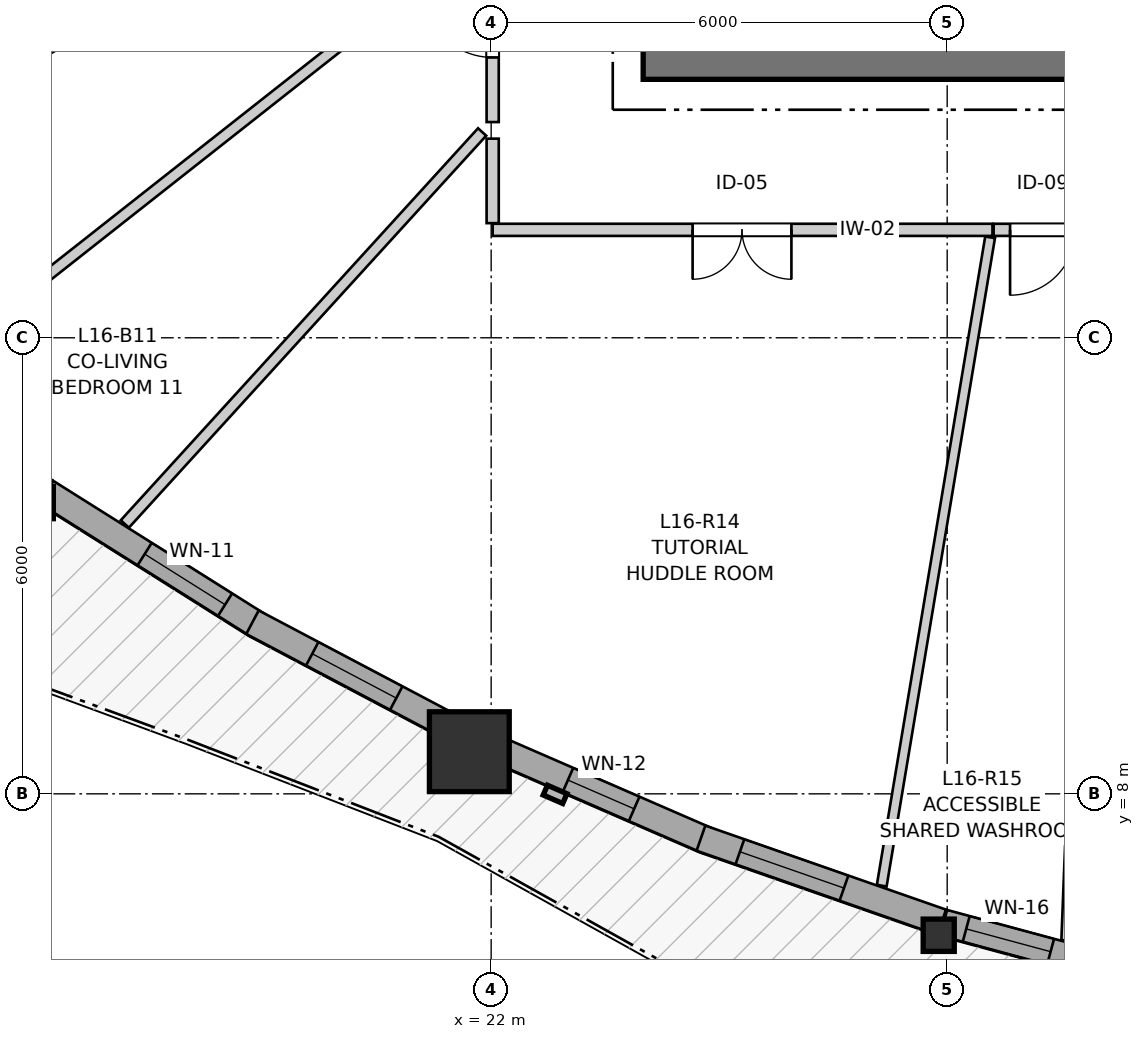
"""IFC4 building model, lengths in metres.
Left out: names, types, materials, properties, quantities, classifications, styles, units other than length and angle.
Written with IfcOpenShell. Run it as: python <this file> out.ifc"""

import sys

from ifc_helpers import new_model, si_unit, direction, frame, frame_2d, origin, origin_2d, place, context, subcontext, project, spatial, rectangle, i_section, extrude, source, transform, mapped, element, fill, save


model = new_model("IFC4")
c1 = context("Model", 3, precision=1e-05, world=origin(), true_north=direction((0.0, 1.0)))
c2 = subcontext(c1, "Body", "Model", "MODEL_VIEW")
j1 = project(units=[si_unit("LENGTHUNIT", "METRE"), si_unit("PLANEANGLEUNIT", "RADIAN")], contexts=[c1])
p1 = place(None, origin())
s1 = spatial("IfcSite", under=j1, at=p1, CompositionType="ELEMENT")
p2 = place(p1, origin())
s2 = spatial("IfcBuilding", under=s1, at=p2, CompositionType="ELEMENT")
p3 = place(p2, frame((0.0, 0.0, 55.8)))
s3 = spatial("IfcBuildingStorey", under=s2, at=p3, CompositionType="ELEMENT", Elevation=55.8)
p4 = place(p3, frame((24.0, 17.8, 0.0), z_axis=(0.0, 0.0, 1.0), x_axis=(1.0, 0.0, 0.0)))
e1 = element("IfcWall", 1, at=p4, inside=s3, PredefinedType="SHEAR", context=c2, shape_type="SweptSolid", body=[
    extrude(rectangle(XDim=12.7, YDim=0.8, at=frame_2d((6.35, 0.0))), origin(), (0.0, 0.0, 1.0), 2.94),
])
m1 = source(origin(), c2, "Body", "SweptSolid", [
    extrude(i_section(OverallWidth=0.409, OverallDepth=0.425, WebThickness=0.03, FlangeThickness=0.048, FilletRadius=0.015, at=origin_2d()), origin(), (0.0, 0.0, 1.0), 2.94),
])
p5 = place(p3, frame((16.035, 11.832, 0.0), z_axis=(0.0, 0.0, 1.0), x_axis=(1.0, 0.0, 0.0)))
e2 = element("IfcColumn", 2, at=p5, inside=s3, PredefinedType="PILASTER", context=c2, shape_type="MappedRepresentation", body=[
    mapped(m1, transform((0.0, 0.0, 0.0), x_axis=(1.0, 0.0, 0.0), y_axis=(0.0, 1.0, 0.0), z_axis=(0.0, 0.0, 1.0), scale=1.0)),
])
m2 = source(origin(), c2, "Body", "SweptSolid", [
    extrude(rectangle(XDim=1.05, YDim=1.05, at=origin_2d()), origin(), (0.0, 0.0, 1.0), 2.94),
])
p6 = place(p3, frame((21.713, 8.554, 0.0), z_axis=(0.0, 0.0, 1.0), x_axis=(1.0, 0.0, 0.0)))
e3 = element("IfcColumn", 3, at=p6, inside=s3, PredefinedType="COLUMN", context=c2, shape_type="MappedRepresentation", body=[
    mapped(m2, transform((0.0, 0.0, 0.0), x_axis=(1.0, 0.0, 0.0), y_axis=(0.0, 1.0, 0.0), z_axis=(0.0, 0.0, 1.0), scale=1.0)),
])
p7 = place(p3, frame((27.888, 6.139, 0.0), z_axis=(0.0, 0.0, 1.0), x_axis=(1.0, 0.0, 0.0)))
e4 = element("IfcColumn", 4, at=p7, inside=s3, PredefinedType="PILASTER", context=c2, shape_type="MappedRepresentation", body=[
    mapped(m1, transform((0.0, 0.0, 0.0), x_axis=(1.0, 0.0, 0.0), y_axis=(0.0, 1.0, 0.0), z_axis=(0.0, 0.0, 1.0), scale=1.0)),
])
p8 = place(p3, frame((13.457, 13.958, 0.0), z_axis=(0.0, 0.0, 1.0), x_axis=(0.803790514758, -0.594912437578, 0.0)))
e5 = element("IfcWall", 5, at=p8, inside=s3, PredefinedType="SOLIDWALL", context=c2, shape_type="SweptSolid", body=[
    extrude(rectangle(XDim=3.317, YDim=0.35, at=frame_2d((1.659, 0.0))), origin(), (0.0, 0.0, 1.0), 2.42),
])
p9 = place(p8, frame((1.468, 0.0, 0.82)))
e6 = element("IfcOpeningElement", 6, at=p9, cuts=e5, PredefinedType="OPENING", context=c2, shape_type="SweptSolid", body=[
    extrude(rectangle(XDim=1.4, YDim=1.35, at=frame_2d((0.7, 0.675))), frame((0.0, 0.185, 0.0), z_axis=(0.0, -1.0, 0.0), x_axis=(1.0, 0.0, 0.0)), (0.0, 0.0, 1.0), 0.37),
])
p10 = place(p3, frame((16.146, 11.97, 0.0), z_axis=(0.0, 0.0, 1.0), x_axis=(0.846405860611, -0.532538373381, 0.0)))
e7 = element("IfcWall", 7, at=p10, inside=s3, PredefinedType="SOLIDWALL", context=c2, shape_type="SweptSolid", body=[
    extrude(rectangle(XDim=3.298, YDim=0.35, at=frame_2d((1.649, 0.0))), origin(), (0.0, 0.0, 1.0), 2.42),
])
p11 = place(p10, frame((1.531, 0.0, 0.82)))
e8 = element("IfcOpeningElement", 8, at=p11, cuts=e7, PredefinedType="OPENING", context=c2, shape_type="SweptSolid", body=[
    extrude(rectangle(XDim=1.25, YDim=1.35, at=frame_2d((0.625, 0.675))), frame((0.0, 0.185, 0.0), z_axis=(0.0, -1.0, 0.0), x_axis=(1.0, 0.0, 0.0)), (0.0, 0.0, 1.0), 0.37),
])
p12 = place(p3, frame((18.86, 10.258, 0.0), z_axis=(0.0, 0.0, 1.0), x_axis=(0.884375478211, -0.46677619213, 0.0)))
e9 = element("IfcWall", 9, at=p12, inside=s3, PredefinedType="SOLIDWALL", context=c2, shape_type="SweptSolid", body=[
    extrude(rectangle(XDim=3.019, YDim=0.35, at=frame_2d((1.509, 0.0))), origin(), (0.0, 0.0, 1.0), 2.42),
])
p13 = place(p12, frame((0.889, 0.0, 0.82)))
e10 = element("IfcOpeningElement", 10, at=p13, cuts=e9, PredefinedType="OPENING", context=c2, shape_type="SweptSolid", body=[
    extrude(rectangle(XDim=1.25, YDim=1.35, at=frame_2d((0.625, 0.675))), frame((0.0, 0.185, 0.0), z_axis=(0.0, -1.0, 0.0), x_axis=(1.0, 0.0, 0.0)), (0.0, 0.0, 1.0), 0.37),
])
p14 = place(p3, frame((22.058, 8.595, 0.0), z_axis=(0.0, 0.0, 1.0), x_axis=(0.917112224483, -0.398629110458, 0.0)))
e11 = element("IfcWall", 11, at=p14, inside=s3, PredefinedType="SOLIDWALL", context=c2, shape_type="SweptSolid", body=[
    extrude(rectangle(XDim=3.037, YDim=0.35, at=frame_2d((1.519, 0.0))), origin(), (0.0, 0.0, 1.0), 2.42),
])
p15 = place(p14, frame((1.039, 0.0, 0.82)))
e12 = element("IfcOpeningElement", 12, at=p15, cuts=e11, PredefinedType="OPENING", context=c2, shape_type="SweptSolid", body=[
    extrude(rectangle(XDim=0.95, YDim=1.35, at=frame_2d((0.475, 0.675))), frame((0.0, 0.185, 0.0), z_axis=(0.0, -1.0, 0.0), x_axis=(1.0, 0.0, 0.0)), (0.0, 0.0, 1.0), 0.37),
])
p16 = place(p3, frame((24.76, 7.417, 0.0), z_axis=(0.0, 0.0, 1.0), x_axis=(0.944134890247, -0.329559264804, 0.0)))
e13 = element("IfcWall", 13, at=p16, inside=s3, PredefinedType="SOLIDWALL", context=c2, shape_type="SweptSolid", body=[
    extrude(rectangle(XDim=3.354, YDim=0.35, at=frame_2d((1.677, 0.0))), origin(), (0.0, 0.0, 1.0), 2.42),
])
p17 = place(p16, frame((0.543, 0.0, 0.82)))
e14 = element("IfcOpeningElement", 14, at=p17, cuts=e13, PredefinedType="OPENING", context=c2, shape_type="SweptSolid", body=[
    extrude(rectangle(XDim=1.45, YDim=1.25, at=frame_2d((0.725, 0.625))), frame((0.0, 0.185, 0.0), z_axis=(0.0, -1.0, 0.0), x_axis=(1.0, 0.0, 0.0)), (0.0, 0.0, 1.0), 0.37),
])
p18 = place(p3, frame((27.953, 6.303, 0.0), z_axis=(0.0, 0.0, 1.0), x_axis=(0.965464207527, -0.260535724968, 0.0)))
e15 = element("IfcWall", 15, at=p18, inside=s3, PredefinedType="SOLIDWALL", context=c2, shape_type="SweptSolid", body=[
    extrude(rectangle(XDim=3.41, YDim=0.35, at=frame_2d((1.705, 0.0))), origin(), (0.0, 0.0, 1.0), 2.42),
])
p19 = place(p18, frame((0.308, 0.0, 0.82)))
e16 = element("IfcOpeningElement", 16, at=p19, cuts=e15, PredefinedType="OPENING", context=c2, shape_type="SweptSolid", body=[
    extrude(rectangle(XDim=1.15, YDim=1.2, at=frame_2d((0.575, 0.6))), frame((0.0, 0.185, 0.0), z_axis=(0.0, -1.0, 0.0), x_axis=(1.0, 0.0, 0.0)), (0.0, 0.0, 1.0), 0.37),
])
p20 = place(p18, frame((1.853, 0.0, 0.82)))
e17 = element("IfcOpeningElement", 17, at=p20, cuts=e15, PredefinedType="OPENING", context=c2, shape_type="SweptSolid", body=[
    extrude(rectangle(XDim=1.25, YDim=1.35, at=frame_2d((0.625, 0.675))), frame((0.0, 0.185, 0.0), z_axis=(0.0, -1.0, 0.0), x_axis=(1.0, 0.0, 0.0)), (0.0, 0.0, 1.0), 0.37),
])
p21 = place(p3, frame((28.596, 15.42, 0.0), z_axis=(0.0, 0.0, 1.0), x_axis=(-1.0, 0.0, 0.0)))
e18 = element("IfcWall", 18, at=p21, inside=s3, PredefinedType="PARTITIONING", context=c2, shape_type="SweptSolid", body=[
    extrude(rectangle(XDim=6.576, YDim=0.16, at=frame_2d((3.288, 0.0))), origin(), (0.0, 0.0, 1.0), 2.94),
])
p22 = place(p21, frame((2.646, 0.0, 0.0)))
e19 = element("IfcOpeningElement", 19, at=p22, cuts=e18, PredefinedType="OPENING", context=c2, shape_type="SweptSolid", body=[
    extrude(rectangle(XDim=1.3, YDim=2.1, at=frame_2d((0.65, 1.05))), frame((0.0, 0.09, 0.0), z_axis=(0.0, -1.0, 0.0), x_axis=(1.0, 0.0, 0.0)), (0.0, 0.0, 1.0), 0.18),
])
p23 = place(p3, frame((22.02, 16.838, 0.0), z_axis=(0.0, 0.0, 1.0), x_axis=(0.0, 1.0, 0.0)))
e20 = element("IfcWall", 20, at=p23, inside=s3, PredefinedType="PARTITIONING", context=c2, shape_type="SweptSolid", body=[
    extrude(rectangle(XDim=2.618, YDim=0.16, at=frame_2d((1.309, 0.0))), origin(), (0.0, 0.0, 1.0), 2.94),
])
p24 = place(p23, frame((0.85, 0.0, 0.0)))
e21 = element("IfcOpeningElement", 21, at=p24, cuts=e20, PredefinedType="OPENING", context=c2, shape_type="SweptSolid", body=[
    extrude(rectangle(XDim=0.92, YDim=2.1, at=frame_2d((0.46, 1.05))), frame((0.0, 0.09, 0.0), z_axis=(0.0, -1.0, 0.0), x_axis=(1.0, 0.0, 0.0)), (0.0, 0.0, 1.0), 0.18),
])
p25 = place(p3, frame((29.949, 15.42, 0.0), z_axis=(0.0, 0.0, 1.0), x_axis=(-1.0, 0.0, 0.0)))
e22 = element("IfcWall", 22, at=p25, inside=s3, PredefinedType="PARTITIONING", context=c2, shape_type="SweptSolid", body=[
    extrude(rectangle(XDim=1.338, YDim=0.16, at=frame_2d((0.669, 0.0))), origin(), (0.0, 0.0, 1.0), 2.94),
])
p26 = place(p25, frame((0.261, 0.0, 0.0)))
e23 = element("IfcOpeningElement", 23, at=p26, cuts=e22, PredefinedType="OPENING", context=c2, shape_type="SweptSolid", body=[
    extrude(rectangle(XDim=0.86, YDim=2.05, at=frame_2d((0.43, 1.025))), frame((0.0, 0.09, 0.0), z_axis=(0.0, -1.0, 0.0), x_axis=(1.0, 0.0, 0.0)), (0.0, 0.0, 1.0), 0.18),
])
p27 = place(p3, frame((12.049, 15.422, 0.0), z_axis=(0.0, 0.0, 1.0), x_axis=(0.865775806306, 0.500432066534, 0.0)))
e24 = element("IfcWall", 24, at=p27, inside=s3, PredefinedType="PARTITIONING", context=c2, shape_type="SweptSolid", body=[
    extrude(rectangle(XDim=11.375, YDim=0.145, at=frame_2d((5.688, 0.0))), origin(), (0.0, 0.0, 1.0), 2.94),
])
p28 = place(p3, frame((14.452, 13.473, 0.0), z_axis=(0.0, 0.0, 1.0), x_axis=(0.785461283481, 0.618910794988, 0.0)))
e25 = element("IfcWall", 25, at=p28, inside=s3, PredefinedType="PARTITIONING", context=c2, shape_type="SweptSolid", body=[
    extrude(rectangle(XDim=9.468, YDim=0.145, at=frame_2d((4.734, 0.0))), origin(), (0.0, 0.0, 1.0), 2.94),
])
p29 = place(p3, frame((29.567, 6.072, 0.0), z_axis=(0.0, 0.0, 1.0), x_axis=(0.039185050788, 0.999231970963, 0.0)))
e26 = element("IfcWall", 26, at=p29, inside=s3, PredefinedType="PARTITIONING", context=c2, shape_type="SweptSolid", body=[
    extrude(rectangle(XDim=9.265, YDim=0.13, at=frame_2d((4.632, 0.0))), origin(), (0.0, 0.0, 1.0), 2.94),
])
p30 = place(p3, frame((27.139, 6.792, 0.0), z_axis=(0.0, 0.0, 1.0), x_axis=(0.164847632872, 0.986319044699, 0.0)))
e27 = element("IfcWall", 27, at=p30, inside=s3, PredefinedType="PARTITIONING", context=c2, shape_type="SweptSolid", body=[
    extrude(rectangle(XDim=8.648, YDim=0.13, at=frame_2d((4.324, 0.0))), origin(), (0.0, 0.0, 1.0), 2.94),
])
p31 = place(p3, frame((17.18, 11.55, 0.0), z_axis=(0.0, 0.0, 1.0), x_axis=(0.673657773225, 0.739043438895, 0.0)))
e28 = element("IfcWall", 28, at=p31, inside=s3, PredefinedType="PARTITIONING", context=c2, shape_type="SweptSolid", body=[
    extrude(rectangle(XDim=6.979, YDim=0.145, at=frame_2d((3.489, 0.0))), origin(), (0.0, 0.0, 1.0), 2.94),
])
p32 = place(p3, frame((22.02, 15.508, 0.0), z_axis=(0.0, 0.0, 1.0), x_axis=(0.0, 1.0, 0.0)))
e29 = element("IfcWall", 29, at=p32, inside=s3, PredefinedType="PARTITIONING", context=c2, shape_type="SweptSolid", body=[
    extrude(rectangle(XDim=1.112, YDim=0.16, at=frame_2d((0.556, 0.0))), origin(), (0.0, 0.0, 1.0), 2.94),
])
m3 = source(origin(), c2, "Body", "SweptSolid", [
    extrude(rectangle(XDim=1.25, YDim=1.35, at=frame_2d((0.625, 0.675))), frame((0.0, 0.03, 0.0), z_axis=(0.0, -1.0, 0.0), x_axis=(1.0, 0.0, 0.0)), (0.0, 0.0, 1.0), 0.06),
])
p33 = place(p11, origin())
e30 = element("IfcWindow", 30, at=p33, inside=s3, PartitioningType="SINGLE_PANEL", PredefinedType="WINDOW", context=c2, shape_type="MappedRepresentation", body=[
    mapped(m3, transform((0.0, 0.0, 0.0), x_axis=(1.0, 0.0, 0.0), y_axis=(0.0, 1.0, 0.0), z_axis=(0.0, 0.0, 1.0), scale=1.0)),
])
fill(e8, e30)
p34 = place(p13, origin())
e31 = element("IfcWindow", 31, at=p34, inside=s3, PartitioningType="SINGLE_PANEL", PredefinedType="WINDOW", context=c2, shape_type="MappedRepresentation", body=[
    mapped(m3, transform((0.0, 0.0, 0.0), x_axis=(1.0, 0.0, 0.0), y_axis=(0.0, 1.0, 0.0), z_axis=(0.0, 0.0, 1.0), scale=1.0)),
])
fill(e10, e31)
m4 = source(origin(), c2, "Body", "SweptSolid", [
    extrude(rectangle(XDim=0.95, YDim=1.35, at=frame_2d((0.475, 0.675))), frame((0.0, 0.03, 0.0), z_axis=(0.0, -1.0, 0.0), x_axis=(1.0, 0.0, 0.0)), (0.0, 0.0, 1.0), 0.06),
])
p35 = place(p15, origin())
e32 = element("IfcWindow", 32, at=p35, inside=s3, PartitioningType="SINGLE_PANEL", PredefinedType="WINDOW", context=c2, shape_type="MappedRepresentation", body=[
    mapped(m4, transform((0.0, 0.0, 0.0), x_axis=(1.0, 0.0, 0.0), y_axis=(0.0, 1.0, 0.0), z_axis=(0.0, 0.0, 1.0), scale=1.0)),
])
fill(e12, e32)
m5 = source(origin(), c2, "Body", "SweptSolid", [
    extrude(rectangle(XDim=1.45, YDim=1.25, at=frame_2d((0.725, 0.625))), frame((0.0, 0.03, 0.0), z_axis=(0.0, -1.0, 0.0), x_axis=(1.0, 0.0, 0.0)), (0.0, 0.0, 1.0), 0.06),
])
p36 = place(p17, origin())
e33 = element("IfcWindow", 33, at=p36, inside=s3, PartitioningType="SINGLE_PANEL", PredefinedType="WINDOW", context=c2, shape_type="MappedRepresentation", body=[
    mapped(m5, transform((0.0, 0.0, 0.0), x_axis=(1.0, 0.0, 0.0), y_axis=(0.0, 1.0, 0.0), z_axis=(0.0, 0.0, 1.0), scale=1.0)),
])
fill(e14, e33)
m6 = source(origin(), c2, "Body", "SweptSolid", [
    extrude(rectangle(XDim=1.15, YDim=1.2, at=frame_2d((0.575, 0.6))), frame((0.0, 0.03, 0.0), z_axis=(0.0, -1.0, 0.0), x_axis=(1.0, 0.0, 0.0)), (0.0, 0.0, 1.0), 0.06),
])
p37 = place(p19, origin())
e34 = element("IfcWindow", 34, at=p37, inside=s3, PartitioningType="SINGLE_PANEL", PredefinedType="WINDOW", context=c2, shape_type="MappedRepresentation", body=[
    mapped(m6, transform((0.0, 0.0, 0.0), x_axis=(1.0, 0.0, 0.0), y_axis=(0.0, 1.0, 0.0), z_axis=(0.0, 0.0, 1.0), scale=1.0)),
])
fill(e16, e34)
m7 = source(origin(), c2, "Body", "SweptSolid", [
    extrude(rectangle(XDim=1.3, YDim=2.1, at=frame_2d((0.65, 1.05))), frame((0.0, 0.025, 0.0), z_axis=(0.0, -1.0, 0.0), x_axis=(1.0, 0.0, 0.0)), (0.0, 0.0, 1.0), 0.05),
])
p38 = place(p22, origin())
e35 = element("IfcDoor", 35, at=p38, inside=s3, OperationType="DOUBLE_DOOR_SINGLE_SWING", PredefinedType="DOOR", context=c2, shape_type="MappedRepresentation", body=[
    mapped(m7, transform((0.0, 0.0, 0.0), x_axis=(1.0, 0.0, 0.0), y_axis=(0.0, 1.0, 0.0), z_axis=(0.0, 0.0, 1.0), scale=1.0)),
])
fill(e19, e35)
m8 = source(origin(), c2, "Body", "SweptSolid", [
    extrude(rectangle(XDim=0.92, YDim=2.1, at=frame_2d((0.46, 1.05))), frame((0.0, 0.025, 0.0), z_axis=(0.0, -1.0, 0.0), x_axis=(1.0, 0.0, 0.0)), (0.0, 0.0, 1.0), 0.05),
])
p39 = place(p24, origin())
e36 = element("IfcDoor", 36, at=p39, inside=s3, OperationType="SINGLE_SWING_RIGHT", PredefinedType="DOOR", context=c2, shape_type="MappedRepresentation", body=[
    mapped(m8, transform((0.0, 0.0, 0.0), x_axis=(1.0, 0.0, 0.0), y_axis=(0.0, 1.0, 0.0), z_axis=(0.0, 0.0, 1.0), scale=1.0)),
])
fill(e21, e36)
m9 = source(origin(), c2, "Body", "SweptSolid", [
    extrude(rectangle(XDim=0.86, YDim=2.05, at=frame_2d((0.43, 1.025))), frame((0.0, 0.025, 0.0), z_axis=(0.0, -1.0, 0.0), x_axis=(1.0, 0.0, 0.0)), (0.0, 0.0, 1.0), 0.05),
])
p40 = place(p26, origin())
e37 = element("IfcDoor", 37, at=p40, inside=s3, OperationType="SINGLE_SWING_RIGHT", PredefinedType="DOOR", context=c2, shape_type="MappedRepresentation", body=[
    mapped(m9, transform((0.0, 0.0, 0.0), x_axis=(1.0, 0.0, 0.0), y_axis=(0.0, 1.0, 0.0), z_axis=(0.0, 0.0, 1.0), scale=1.0)),
])
fill(e23, e37)
save(model, sys.argv[1])
